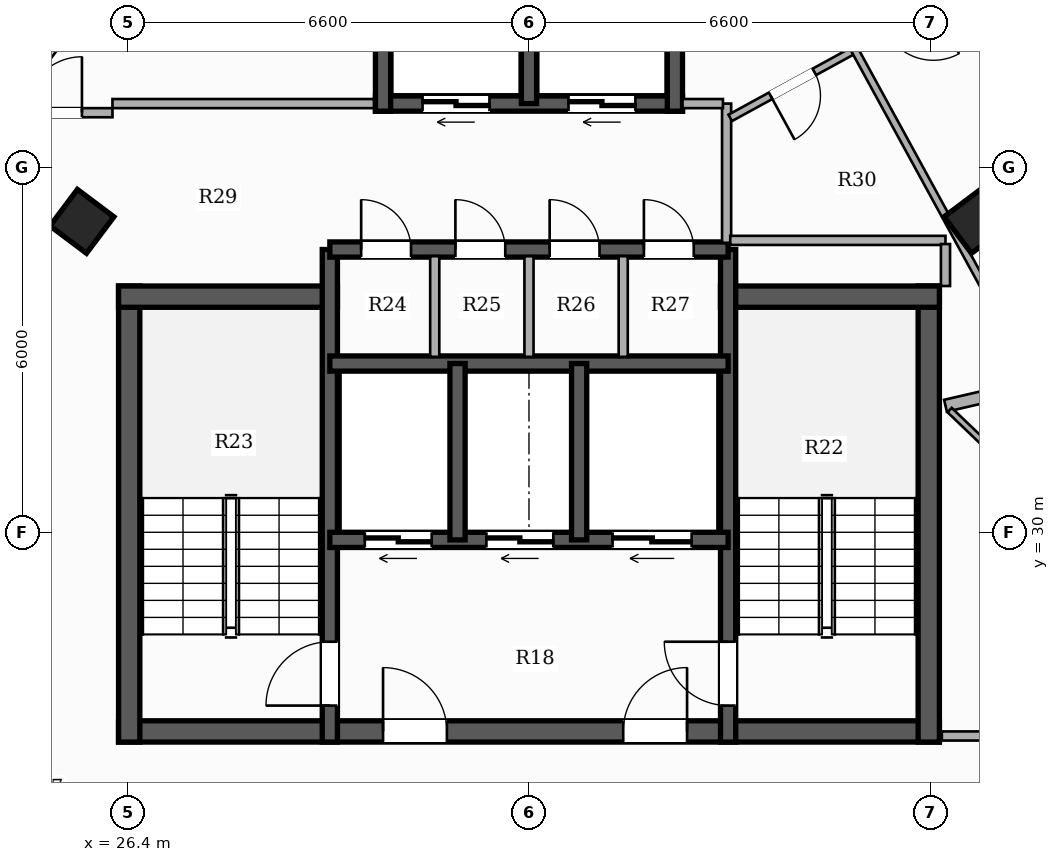
"""IFC4 building model, lengths in metres.
Left out: names, types, materials, properties, quantities, classifications, styles, units other than length and angle.
Written with IfcOpenShell. Run it as: python <this file> out.ifc"""

import sys

from ifc_helpers import new_model, si_unit, direction, frame, frame_2d, origin, origin_2d, place, context, subcontext, project, spatial, rectangle, hollow_rectangle, extrude, element, fill, save


model = new_model("IFC4")
c1 = context("Model", 3, precision=1e-05, world=origin(), true_north=direction((0.0, 1.0)))
c2 = subcontext(c1, "Body", "Model", "MODEL_VIEW")
j1 = project(units=[si_unit("LENGTHUNIT", "METRE"), si_unit("PLANEANGLEUNIT", "RADIAN")], contexts=[c1])
p1 = place(None, origin())
s1 = spatial("IfcSite", under=j1, at=p1, CompositionType="ELEMENT")
p2 = place(p1, origin())
s2 = spatial("IfcBuilding", under=s1, at=p2, CompositionType="ELEMENT")
p3 = place(p2, frame((0.0, 0.0, 216.2)))
s3 = spatial("IfcBuildingStorey", under=s2, at=p3, CompositionType="ELEMENT", Elevation=216.2)
p4 = place(p3, frame((26.25, 26.725, 0.0), z_axis=(0.0, 0.0, 1.0), x_axis=(1.0, 0.0, 0.0)))
e1 = element("IfcWall", 1, at=p4, inside=s3, PredefinedType="SHEAR", context=c2, shape_type="SweptSolid", body=[
    extrude(rectangle(XDim=13.5, YDim=0.35, at=frame_2d((6.75, 0.0))), origin(), (0.0, 0.0, 1.0), 3.3),
])
p5 = place(p4, frame((4.35, 0.0, 0.0)))
e2 = element("IfcOpeningElement", 2, at=p5, cuts=e1, PredefinedType="OPENING", context=c2, shape_type="SweptSolid", body=[
    extrude(rectangle(XDim=1.05, YDim=2.15, at=frame_2d((0.525, 1.075))), frame((0.0, 0.185, 0.0), z_axis=(0.0, -1.0, 0.0), x_axis=(1.0, 0.0, 0.0)), (0.0, 0.0, 1.0), 0.37),
])
p6 = place(p4, frame((8.3, 0.0, 0.0)))
e3 = element("IfcOpeningElement", 3, at=p6, cuts=e1, PredefinedType="OPENING", context=c2, shape_type="SweptSolid", body=[
    extrude(rectangle(XDim=1.05, YDim=2.15, at=frame_2d((0.525, 1.075))), frame((0.0, 0.185, 0.0), z_axis=(0.0, -1.0, 0.0), x_axis=(1.0, 0.0, 0.0)), (0.0, 0.0, 1.0), 0.37),
])
p7 = place(p3, frame((26.425, 26.55, 0.0), z_axis=(0.0, 0.0, 1.0), x_axis=(0.0, 1.0, 0.0)))
e4 = element("IfcWall", 4, at=p7, inside=s3, PredefinedType="SHEAR", context=c2, shape_type="SweptSolid", body=[
    extrude(rectangle(XDim=7.5, YDim=0.35, at=frame_2d((3.75, 0.0))), origin(), (0.0, 0.0, 1.0), 3.3),
])
p8 = place(p3, frame((26.25, 33.875, 0.0), z_axis=(0.0, 0.0, 1.0), x_axis=(1.0, 0.0, 0.0)))
e5 = element("IfcWall", 5, at=p8, inside=s3, PredefinedType="SHEAR", context=c2, shape_type="SweptSolid", body=[
    extrude(rectangle(XDim=3.6, YDim=0.35, at=frame_2d((1.8, 0.0))), origin(), (0.0, 0.0, 1.0), 3.3),
])
p9 = place(p3, frame((39.575, 26.55, 0.0), z_axis=(0.0, 0.0, 1.0), x_axis=(0.0, 1.0, 0.0)))
e6 = element("IfcWall", 6, at=p9, inside=s3, PredefinedType="SHEAR", context=c2, shape_type="SweptSolid", body=[
    extrude(rectangle(XDim=7.5, YDim=0.35, at=frame_2d((3.75, 0.0))), origin(), (0.0, 0.0, 1.0), 3.3),
])
p10 = place(p3, frame((36.15, 33.875, 0.0), z_axis=(0.0, 0.0, 1.0), x_axis=(1.0, 0.0, 0.0)))
e7 = element("IfcWall", 7, at=p10, inside=s3, PredefinedType="SHEAR", context=c2, shape_type="SweptSolid", body=[
    extrude(rectangle(XDim=3.6, YDim=0.35, at=frame_2d((1.8, 0.0))), origin(), (0.0, 0.0, 1.0), 3.3),
])
p11 = place(p3, frame((29.725, 26.55, 0.0), z_axis=(0.0, 0.0, 1.0), x_axis=(0.0, 1.0, 0.0)))
e8 = element("IfcWall", 8, at=p11, inside=s3, PredefinedType="SHEAR", context=c2, shape_type="SweptSolid", body=[
    extrude(rectangle(XDim=8.1, YDim=0.25, at=frame_2d((4.05, 0.0))), origin(), (0.0, 0.0, 1.0), 3.3),
])
p12 = place(p11, frame((0.6, 0.0, 0.0)))
e9 = element("IfcOpeningElement", 9, at=p12, cuts=e8, PredefinedType="OPENING", context=c2, shape_type="SweptSolid", body=[
    extrude(rectangle(XDim=1.05, YDim=2.15, at=frame_2d((0.525, 1.075))), frame((0.0, 0.135, 0.0), z_axis=(0.0, -1.0, 0.0), x_axis=(1.0, 0.0, 0.0)), (0.0, 0.0, 1.0), 0.27),
])
p13 = place(p3, frame((36.275, 26.55, 0.0), z_axis=(0.0, 0.0, 1.0), x_axis=(0.0, 1.0, 0.0)))
e10 = element("IfcWall", 10, at=p13, inside=s3, PredefinedType="SHEAR", context=c2, shape_type="SweptSolid", body=[
    extrude(rectangle(XDim=8.1, YDim=0.25, at=frame_2d((4.05, 0.0))), origin(), (0.0, 0.0, 1.0), 3.3),
])
p14 = place(p13, frame((0.6, 0.0, 0.0)))
e11 = element("IfcOpeningElement", 11, at=p14, cuts=e10, PredefinedType="OPENING", context=c2, shape_type="SweptSolid", body=[
    extrude(rectangle(XDim=1.05, YDim=2.15, at=frame_2d((0.525, 1.075))), frame((0.0, 0.135, 0.0), z_axis=(0.0, -1.0, 0.0), x_axis=(1.0, 0.0, 0.0)), (0.0, 0.0, 1.0), 0.27),
])
p15 = place(p3, frame((36.275, 29.875, 0.0), z_axis=(0.0, 0.0, 1.0), x_axis=(-1.0, 0.0, 0.0)))
e12 = element("IfcWall", 12, at=p15, inside=s3, PredefinedType="SHEAR", context=c2, shape_type="SweptSolid", body=[
    extrude(rectangle(XDim=6.55, YDim=0.25, at=frame_2d((3.275, 0.0))), origin(), (0.0, 0.0, 1.0), 3.3),
])
p16 = place(p15, frame((4.875, 0.0, 0.0)))
e13 = element("IfcOpeningElement", 13, at=p16, cuts=e12, PredefinedType="OPENING", context=c2, shape_type="SweptSolid", body=[
    extrude(rectangle(XDim=1.1, YDim=2.2, at=frame_2d((0.55, 1.1))), frame((0.0, 0.135, 0.0), z_axis=(0.0, -1.0, 0.0), x_axis=(1.0, 0.0, 0.0)), (0.0, 0.0, 1.0), 0.27),
])
p17 = place(p15, frame((2.875, 0.0, 0.0)))
e14 = element("IfcOpeningElement", 14, at=p17, cuts=e12, PredefinedType="OPENING", context=c2, shape_type="SweptSolid", body=[
    extrude(rectangle(XDim=1.1, YDim=2.2, at=frame_2d((0.55, 1.1))), frame((0.0, 0.135, 0.0), z_axis=(0.0, -1.0, 0.0), x_axis=(1.0, 0.0, 0.0)), (0.0, 0.0, 1.0), 0.27),
])
p18 = place(p15, frame((0.6, 0.0, 0.0)))
e15 = element("IfcOpeningElement", 15, at=p18, cuts=e12, PredefinedType="OPENING", context=c2, shape_type="SweptSolid", body=[
    extrude(rectangle(XDim=1.3, YDim=2.2, at=frame_2d((0.65, 1.1))), frame((0.0, 0.135, 0.0), z_axis=(0.0, -1.0, 0.0), x_axis=(1.0, 0.0, 0.0)), (0.0, 0.0, 1.0), 0.27),
])
p19 = place(p3, frame((29.725, 32.775, 0.0), z_axis=(0.0, 0.0, 1.0), x_axis=(1.0, 0.0, 0.0)))
e16 = element("IfcWall", 16, at=p19, inside=s3, PredefinedType="SHEAR", context=c2, shape_type="SweptSolid", body=[
    extrude(rectangle(XDim=6.55, YDim=0.25, at=frame_2d((3.275, 0.0))), origin(), (0.0, 0.0, 1.0), 3.3),
])
for number, where, z_axis, x_axis in (
    (17, (31.825, 29.875, 0.0), (0.0, 0.0, 1.0), (0.0, 1.0, 0.0)),
    (18, (33.825, 29.875, 0.0), (0.0, 0.0, 1.0), (0.0, 1.0, 0.0)),
):
    element("IfcWall", number, at=place(p3, frame(where, z_axis=z_axis, x_axis=x_axis)), inside=s3, PredefinedType="SHEAR", context=c2, shape_type="SweptSolid", body=[
        extrude(rectangle(XDim=2.9, YDim=0.25, at=frame_2d((1.45, 0.0))), origin(), (0.0, 0.0, 1.0), 3.3),
    ])
p20 = place(p3, frame((29.725, 34.65, 0.0), z_axis=(0.0, 0.0, 1.0), x_axis=(1.0, 0.0, 0.0)))
e19 = element("IfcWall", 19, at=p20, inside=s3, PredefinedType="SHEAR", context=c2, shape_type="SweptSolid", body=[
    extrude(rectangle(XDim=6.55, YDim=0.25, at=frame_2d((3.275, 0.0))), origin(), (0.0, 0.0, 1.0), 3.3),
])
p21 = place(p20, frame((0.515, 0.0, 0.0)))
e20 = element("IfcOpeningElement", 20, at=p21, cuts=e19, PredefinedType="OPENING", context=c2, shape_type="SweptSolid", body=[
    extrude(rectangle(XDim=0.82, YDim=2.1, at=frame_2d((0.41, 1.05))), frame((0.0, 0.135, 0.0), z_axis=(0.0, -1.0, 0.0), x_axis=(1.0, 0.0, 0.0)), (0.0, 0.0, 1.0), 0.27),
])
p22 = place(p20, frame((2.065, 0.0, 0.0)))
e21 = element("IfcOpeningElement", 21, at=p22, cuts=e19, PredefinedType="OPENING", context=c2, shape_type="SweptSolid", body=[
    extrude(rectangle(XDim=0.82, YDim=2.1, at=frame_2d((0.41, 1.05))), frame((0.0, 0.135, 0.0), z_axis=(0.0, -1.0, 0.0), x_axis=(1.0, 0.0, 0.0)), (0.0, 0.0, 1.0), 0.27),
])
p23 = place(p20, frame((3.615, 0.0, 0.0)))
e22 = element("IfcOpeningElement", 22, at=p23, cuts=e19, PredefinedType="OPENING", context=c2, shape_type="SweptSolid", body=[
    extrude(rectangle(XDim=0.82, YDim=2.1, at=frame_2d((0.41, 1.05))), frame((0.0, 0.135, 0.0), z_axis=(0.0, -1.0, 0.0), x_axis=(1.0, 0.0, 0.0)), (0.0, 0.0, 1.0), 0.27),
])
p24 = place(p20, frame((5.165, 0.0, 0.0)))
e23 = element("IfcOpeningElement", 23, at=p24, cuts=e19, PredefinedType="OPENING", context=c2, shape_type="SweptSolid", body=[
    extrude(rectangle(XDim=0.82, YDim=2.1, at=frame_2d((0.41, 1.05))), frame((0.0, 0.135, 0.0), z_axis=(0.0, -1.0, 0.0), x_axis=(1.0, 0.0, 0.0)), (0.0, 0.0, 1.0), 0.27),
])
p25 = place(p3, frame((35.525, 37.05, 0.0), z_axis=(0.0, 0.0, 1.0), x_axis=(-1.0, 0.0, 0.0)))
e24 = element("IfcWall", 24, at=p25, inside=s3, PredefinedType="SHEAR", context=c2, shape_type="SweptSolid", body=[
    extrude(rectangle(XDim=5.05, YDim=0.25, at=frame_2d((2.525, 0.0))), origin(), (0.0, 0.0, 1.0), 3.3),
])
p26 = place(p25, frame((3.175, 0.0, 0.0)))
e25 = element("IfcOpeningElement", 25, at=p26, cuts=e24, PredefinedType="OPENING", context=c2, shape_type="SweptSolid", body=[
    extrude(rectangle(XDim=1.1, YDim=2.2, at=frame_2d((0.55, 1.1))), frame((0.0, 0.135, 0.0), z_axis=(0.0, -1.0, 0.0), x_axis=(1.0, 0.0, 0.0)), (0.0, 0.0, 1.0), 0.27),
])
p27 = place(p25, frame((0.775, 0.0, 0.0)))
e26 = element("IfcOpeningElement", 26, at=p27, cuts=e24, PredefinedType="OPENING", context=c2, shape_type="SweptSolid", body=[
    extrude(rectangle(XDim=1.1, YDim=2.2, at=frame_2d((0.55, 1.1))), frame((0.0, 0.135, 0.0), z_axis=(0.0, -1.0, 0.0), x_axis=(1.0, 0.0, 0.0)), (0.0, 0.0, 1.0), 0.27),
])
for number, where, z_axis, x_axis in (
    (27, (30.6, 36.925, 0.0), (0.0, 0.0, 1.0), (0.0, 1.0, 0.0)),
    (28, (35.4, 36.925, 0.0), (0.0, 0.0, 1.0), (0.0, 1.0, 0.0)),
):
    element("IfcWall", number, at=place(p3, frame(where, z_axis=z_axis, x_axis=x_axis)), inside=s3, PredefinedType="SHEAR", context=c2, shape_type="SweptSolid", body=[
        extrude(rectangle(XDim=2.8, YDim=0.25, at=frame_2d((1.4, 0.0))), origin(), (0.0, 0.0, 1.0), 3.3),
    ])
p28 = place(p3, frame((33.0, 37.05, 0.0), z_axis=(0.0, 0.0, 1.0), x_axis=(0.0, 1.0, 0.0)))
e29 = element("IfcWall", 29, at=p28, inside=s3, PredefinedType="SHEAR", context=c2, shape_type="SweptSolid", body=[
    extrude(rectangle(XDim=2.55, YDim=0.25, at=frame_2d((1.275, 0.0))), origin(), (0.0, 0.0, 1.0), 3.3),
])
for number, where, z_axis, x_axis in (
    (30, (25.648, 35.113, 0.0), (0.0, 0.0, 1.0), (0.6, 0.8, 0.0)),
    (31, (40.352, 35.113, 0.0), (0.0, 0.0, 1.0), (-0.6, 0.8, 0.0)),
):
    element("IfcColumn", number, at=place(p3, frame(where, z_axis=z_axis, x_axis=x_axis)), inside=s3, PredefinedType="COLUMN", context=c2, shape_type="SweptSolid", body=[
        extrude(hollow_rectangle(XDim=0.75, YDim=0.75, WallThickness=0.025, at=origin_2d()), origin(), (0.0, 0.0, 1.0), 3.3),
    ])
p29 = place(p3, frame((36.25, 34.76, 0.0), z_axis=(0.0, 0.0, 1.0), x_axis=(0.0, 1.0, 0.0)))
e32 = element("IfcWall", 32, at=p29, inside=s3, PredefinedType="PARTITIONING", context=c2, shape_type="SweptSolid", body=[
    extrude(rectangle(XDim=2.29, YDim=0.15, at=frame_2d((1.145, 0.0))), origin(), (0.0, 0.0, 1.0), 2.425),
])
p30 = place(p3, frame((35.525, 37.05, 0.0), z_axis=(0.0, 0.0, 1.0), x_axis=(1.0, 0.0, 0.0)))
e33 = element("IfcWall", 33, at=p30, inside=s3, PredefinedType="PARTITIONING", context=c2, shape_type="SweptSolid", body=[
    extrude(rectangle(XDim=0.665, YDim=0.15, at=frame_2d((0.333, 0.0))), origin(), (0.0, 0.0, 1.0), 2.425),
])
for number, where, z_axis, x_axis in (
    (34, (31.45, 32.885, 0.0), (0.0, 0.0, 1.0), (0.0, 1.0, 0.0)),
    (35, (33.0, 32.885, 0.0), (0.0, 0.0, 1.0), (0.0, 1.0, 0.0)),
    (36, (34.55, 32.885, 0.0), (0.0, 0.0, 1.0), (0.0, 1.0, 0.0)),
):
    element("IfcWall", number, at=place(p3, frame(where, z_axis=z_axis, x_axis=x_axis)), inside=s3, PredefinedType="PARTITIONING", context=c2, shape_type="SweptSolid", body=[
        extrude(rectangle(XDim=1.655, YDim=0.15, at=frame_2d((0.828, 0.0))), origin(), (0.0, 0.0, 1.0), 3.06),
    ])
p31 = place(p3, frame((24.226, 36.9, 0.0), z_axis=(0.0, 0.0, 1.0), x_axis=(1.0, 0.0, 0.0)))
e37 = element("IfcWall", 37, at=p31, inside=s3, PredefinedType="PARTITIONING", context=c2, shape_type="SweptSolid", body=[
    extrude(rectangle(XDim=1.924, YDim=0.15, at=frame_2d((0.962, 0.0))), origin(), (0.0, 0.0, 1.0), 2.619),
])
p32 = place(p31, frame((0.502, 0.0, 0.0)))
e38 = element("IfcOpeningElement", 38, at=p32, cuts=e37, PredefinedType="OPENING", context=c2, shape_type="SweptSolid", body=[
    extrude(rectangle(XDim=0.92, YDim=2.15, at=frame_2d((0.46, 1.075))), frame((0.0, 0.085, 0.0), z_axis=(0.0, -1.0, 0.0), x_axis=(1.0, 0.0, 0.0)), (0.0, 0.0, 1.0), 0.17),
])
p33 = place(p3, frame((39.79, 26.65, 0.0), z_axis=(0.0, 0.0, 1.0), x_axis=(1.0, 0.0, 0.0)))
e39 = element("IfcWall", 39, at=p33, inside=s3, PredefinedType="PARTITIONING", context=c2, shape_type="SweptSolid", body=[
    extrude(rectangle(XDim=2.46, YDim=0.15, at=frame_2d((1.23, 0.0))), origin(), (0.0, 0.0, 1.0), 2.565),
])
p34 = place(p3, frame((26.15, 37.05, 0.0), z_axis=(0.0, 0.0, 1.0), x_axis=(1.0, 0.0, 0.0)))
e40 = element("IfcWall", 40, at=p34, inside=s3, PredefinedType="PARTITIONING", context=c2, shape_type="SweptSolid", body=[
    extrude(rectangle(XDim=4.3, YDim=0.15, at=frame_2d((2.15, 0.0))), origin(), (0.0, 0.0, 1.0), 2.425),
])
p35 = place(p3, frame((36.31, 34.8, 0.0), z_axis=(0.0, 0.0, 1.0), x_axis=(1.0, 0.0, 0.0)))
e41 = element("IfcWall", 41, at=p35, inside=s3, PredefinedType="PARTITIONING", context=c2, shape_type="SweptSolid", body=[
    extrude(rectangle(XDim=3.54, YDim=0.15, at=frame_2d((1.77, 0.0))), origin(), (0.0, 0.0, 1.0), 2.425),
])
p36 = place(p3, frame((39.85, 34.74, 0.0), z_axis=(0.0, 0.0, 1.0), x_axis=(0.0, -1.0, 0.0)))
e42 = element("IfcWall", 42, at=p36, inside=s3, PredefinedType="PARTITIONING", context=c2, shape_type="SweptSolid", body=[
    extrude(rectangle(XDim=0.69, YDim=0.15, at=frame_2d((0.345, 0.0))), origin(), (0.0, 0.0, 1.0), 2.773),
])
p37 = place(p3, frame((39.85, 32.081, 0.0), z_axis=(0.0, 0.0, 1.0), x_axis=(0.974339670333, 0.225082666628, 0.0)))
e43 = element("IfcWall", 43, at=p37, inside=s3, PredefinedType="PARTITIONING", context=c2, shape_type="SweptSolid", body=[
    extrude(rectangle(XDim=4.714, YDim=0.2, at=frame_2d((2.357, 0.0))), origin(), (0.0, 0.0, 1.0), 2.492),
])
p38 = place(p3, frame((39.918, 32.01, 0.0), z_axis=(0.0, 0.0, 1.0), x_axis=(0.722311203135, -0.691568164266, 0.0)))
e44 = element("IfcWall", 44, at=p38, inside=s3, PredefinedType="PARTITIONING", context=c2, shape_type="SweptSolid", body=[
    extrude(rectangle(XDim=4.876, YDim=0.1, at=frame_2d((2.438, 0.0))), origin(), (0.0, 0.0, 1.0), 2.773),
])
p39 = place(p38, frame((1.998, 0.0, 0.0)))
e45 = element("IfcOpeningElement", 45, at=p39, cuts=e44, PredefinedType="OPENING", context=c2, shape_type="SweptSolid", body=[
    extrude(rectangle(XDim=0.88, YDim=2.1, at=frame_2d((0.44, 1.05))), frame((0.0, 0.06, 0.0), z_axis=(0.0, -1.0, 0.0), x_axis=(1.0, 0.0, 0.0)), (0.0, 0.0, 1.0), 0.12),
])
p40 = place(p3, frame((38.357, 37.934, 0.0), z_axis=(0.0, 0.0, 1.0), x_axis=(-0.877415192217, -0.479731779714, 0.0)))
e46 = element("IfcWall", 46, at=p40, inside=s3, PredefinedType="PARTITIONING", context=c2, shape_type="SweptSolid", body=[
    extrude(rectangle(XDim=2.333, YDim=0.12, at=frame_2d((1.167, 0.0))), origin(), (0.0, 0.0, 1.0), 2.425),
])
p41 = place(p40, frame((0.756, 0.0, 0.0)))
e47 = element("IfcOpeningElement", 47, at=p41, cuts=e46, PredefinedType="OPENING", context=c2, shape_type="SweptSolid", body=[
    extrude(rectangle(XDim=0.82, YDim=2.1, at=frame_2d((0.41, 1.05))), frame((0.0, 0.07, 0.0), z_axis=(0.0, -1.0, 0.0), x_axis=(1.0, 0.0, 0.0)), (0.0, 0.0, 1.0), 0.14),
])
p42 = place(p3, frame((40.172, 38.927, 0.0), z_axis=(0.0, 0.0, 1.0), x_axis=(-0.877322236726, -0.479901753432, 0.0)))
e48 = element("IfcWall", 48, at=p42, inside=s3, PredefinedType="PARTITIONING", context=c2, shape_type="SweptSolid", body=[
    extrude(rectangle(XDim=2.069, YDim=0.12, at=frame_2d((1.035, 0.0))), origin(), (0.0, 0.0, 1.0), 3.06),
])
p43 = place(p42, frame((0.594, 0.0, 0.0)))
e49 = element("IfcOpeningElement", 49, at=p43, cuts=e48, PredefinedType="OPENING", context=c2, shape_type="SweptSolid", body=[
    extrude(rectangle(XDim=0.88, YDim=2.1, at=frame_2d((0.44, 1.05))), frame((0.0, 0.07, 0.0), z_axis=(0.0, -1.0, 0.0), x_axis=(1.0, 0.0, 0.0)), (0.0, 0.0, 1.0), 0.14),
])
p44 = place(p3, frame((38.357, 37.934, 0.0), z_axis=(0.0, 0.0, 1.0), x_axis=(0.479839410825, -0.877356335715, 0.0)))
e50 = element("IfcWall", 50, at=p44, inside=s3, PredefinedType="PARTITIONING", context=c2, shape_type="SweptSolid", body=[
    extrude(rectangle(XDim=6.183, YDim=0.12, at=frame_2d((3.092, 0.0))), origin(), (0.0, 0.0, 1.0), 2.492),
])
p45 = place(p12, origin())
e51 = element("IfcDoor", 51, at=p45, inside=s3, OperationType="SINGLE_SWING_LEFT", PredefinedType="DOOR", context=c2, shape_type="SweptSolid", body=[
    extrude(rectangle(XDim=1.05, YDim=2.15, at=frame_2d((0.525, 1.075))), frame((0.0, 0.025, 0.0), z_axis=(0.0, -1.0, 0.0), x_axis=(1.0, 0.0, 0.0)), (0.0, 0.0, 1.0), 0.05),
])
fill(e9, e51)
p46 = place(p14, origin())
e52 = element("IfcDoor", 52, at=p46, inside=s3, OperationType="SINGLE_SWING_RIGHT", PredefinedType="DOOR", context=c2, shape_type="SweptSolid", body=[
    extrude(rectangle(XDim=1.05, YDim=2.15, at=frame_2d((0.525, 1.075))), frame((0.0, 0.025, 0.0), z_axis=(0.0, -1.0, 0.0), x_axis=(1.0, 0.0, 0.0)), (0.0, 0.0, 1.0), 0.05),
])
fill(e11, e52)
p47 = place(p5, origin())
e53 = element("IfcDoor", 53, at=p47, inside=s3, OperationType="SINGLE_SWING_LEFT", PredefinedType="DOOR", context=c2, shape_type="SweptSolid", body=[
    extrude(rectangle(XDim=1.05, YDim=2.15, at=frame_2d((0.525, 1.075))), frame((0.0, 0.025, 0.0), z_axis=(0.0, -1.0, 0.0), x_axis=(1.0, 0.0, 0.0)), (0.0, 0.0, 1.0), 0.05),
])
fill(e2, e53)
p48 = place(p6, origin())
e54 = element("IfcDoor", 54, at=p48, inside=s3, OperationType="SINGLE_SWING_RIGHT", PredefinedType="DOOR", context=c2, shape_type="SweptSolid", body=[
    extrude(rectangle(XDim=1.05, YDim=2.15, at=frame_2d((0.525, 1.075))), frame((0.0, 0.025, 0.0), z_axis=(0.0, -1.0, 0.0), x_axis=(1.0, 0.0, 0.0)), (0.0, 0.0, 1.0), 0.05),
])
fill(e3, e54)
p49 = place(p16, origin())
e55 = element("IfcDoor", 55, at=p49, inside=s3, OperationType="DOUBLE_DOOR_SLIDING", PredefinedType="DOOR", context=c2, shape_type="SweptSolid", body=[
    extrude(rectangle(XDim=1.1, YDim=2.2, at=frame_2d((0.55, 1.1))), frame((0.0, 0.025, 0.0), z_axis=(0.0, -1.0, 0.0), x_axis=(1.0, 0.0, 0.0)), (0.0, 0.0, 1.0), 0.05),
])
fill(e13, e55)
p50 = place(p17, origin())
e56 = element("IfcDoor", 56, at=p50, inside=s3, OperationType="DOUBLE_DOOR_SLIDING", PredefinedType="DOOR", context=c2, shape_type="SweptSolid", body=[
    extrude(rectangle(XDim=1.1, YDim=2.2, at=frame_2d((0.55, 1.1))), frame((0.0, 0.025, 0.0), z_axis=(0.0, -1.0, 0.0), x_axis=(1.0, 0.0, 0.0)), (0.0, 0.0, 1.0), 0.05),
])
fill(e14, e56)
p51 = place(p18, origin())
e57 = element("IfcDoor", 57, at=p51, inside=s3, OperationType="DOUBLE_DOOR_SLIDING", PredefinedType="DOOR", context=c2, shape_type="SweptSolid", body=[
    extrude(rectangle(XDim=1.3, YDim=2.2, at=frame_2d((0.65, 1.1))), frame((0.0, 0.025, 0.0), z_axis=(0.0, -1.0, 0.0), x_axis=(1.0, 0.0, 0.0)), (0.0, 0.0, 1.0), 0.05),
])
fill(e15, e57)
p52 = place(p26, origin())
e58 = element("IfcDoor", 58, at=p52, inside=s3, OperationType="DOUBLE_DOOR_SLIDING", PredefinedType="DOOR", context=c2, shape_type="SweptSolid", body=[
    extrude(rectangle(XDim=1.1, YDim=2.2, at=frame_2d((0.55, 1.1))), frame((0.0, 0.025, 0.0), z_axis=(0.0, -1.0, 0.0), x_axis=(1.0, 0.0, 0.0)), (0.0, 0.0, 1.0), 0.05),
])
fill(e25, e58)
p53 = place(p27, origin())
e59 = element("IfcDoor", 59, at=p53, inside=s3, OperationType="DOUBLE_DOOR_SLIDING", PredefinedType="DOOR", context=c2, shape_type="SweptSolid", body=[
    extrude(rectangle(XDim=1.1, YDim=2.2, at=frame_2d((0.55, 1.1))), frame((0.0, 0.025, 0.0), z_axis=(0.0, -1.0, 0.0), x_axis=(1.0, 0.0, 0.0)), (0.0, 0.0, 1.0), 0.05),
])
fill(e26, e59)
p54 = place(p21, origin())
e60 = element("IfcDoor", 60, at=p54, inside=s3, OperationType="SINGLE_SWING_LEFT", PredefinedType="DOOR", context=c2, shape_type="SweptSolid", body=[
    extrude(rectangle(XDim=0.82, YDim=2.1, at=frame_2d((0.41, 1.05))), frame((0.0, 0.025, 0.0), z_axis=(0.0, -1.0, 0.0), x_axis=(1.0, 0.0, 0.0)), (0.0, 0.0, 1.0), 0.05),
])
fill(e20, e60)
p55 = place(p22, origin())
e61 = element("IfcDoor", 61, at=p55, inside=s3, OperationType="SINGLE_SWING_LEFT", PredefinedType="DOOR", context=c2, shape_type="SweptSolid", body=[
    extrude(rectangle(XDim=0.82, YDim=2.1, at=frame_2d((0.41, 1.05))), frame((0.0, 0.025, 0.0), z_axis=(0.0, -1.0, 0.0), x_axis=(1.0, 0.0, 0.0)), (0.0, 0.0, 1.0), 0.05),
])
fill(e21, e61)
p56 = place(p23, origin())
e62 = element("IfcDoor", 62, at=p56, inside=s3, OperationType="SINGLE_SWING_LEFT", PredefinedType="DOOR", context=c2, shape_type="SweptSolid", body=[
    extrude(rectangle(XDim=0.82, YDim=2.1, at=frame_2d((0.41, 1.05))), frame((0.0, 0.025, 0.0), z_axis=(0.0, -1.0, 0.0), x_axis=(1.0, 0.0, 0.0)), (0.0, 0.0, 1.0), 0.05),
])
fill(e22, e62)
p57 = place(p24, origin())
e63 = element("IfcDoor", 63, at=p57, inside=s3, OperationType="SINGLE_SWING_LEFT", PredefinedType="DOOR", context=c2, shape_type="SweptSolid", body=[
    extrude(rectangle(XDim=0.82, YDim=2.1, at=frame_2d((0.41, 1.05))), frame((0.0, 0.025, 0.0), z_axis=(0.0, -1.0, 0.0), x_axis=(1.0, 0.0, 0.0)), (0.0, 0.0, 1.0), 0.05),
])
fill(e23, e63)
p58 = place(p32, origin())
e64 = element("IfcDoor", 64, at=p58, inside=s3, OperationType="SINGLE_SWING_RIGHT", PredefinedType="DOOR", context=c2, shape_type="SweptSolid", body=[
    extrude(rectangle(XDim=0.92, YDim=2.15, at=frame_2d((0.46, 1.075))), frame((0.0, 0.025, 0.0), z_axis=(0.0, -1.0, 0.0), x_axis=(1.0, 0.0, 0.0)), (0.0, 0.0, 1.0), 0.05),
])
fill(e38, e64)
p59 = place(p41, origin())
e65 = element("IfcDoor", 65, at=p59, inside=s3, OperationType="SINGLE_SWING_RIGHT", PredefinedType="DOOR", context=c2, shape_type="SweptSolid", body=[
    extrude(rectangle(XDim=0.82, YDim=2.1, at=frame_2d((0.41, 1.05))), frame((0.0, 0.025, 0.0), z_axis=(0.0, -1.0, 0.0), x_axis=(1.0, 0.0, 0.0)), (0.0, 0.0, 1.0), 0.05),
])
fill(e47, e65)
save(model, sys.argv[1])
